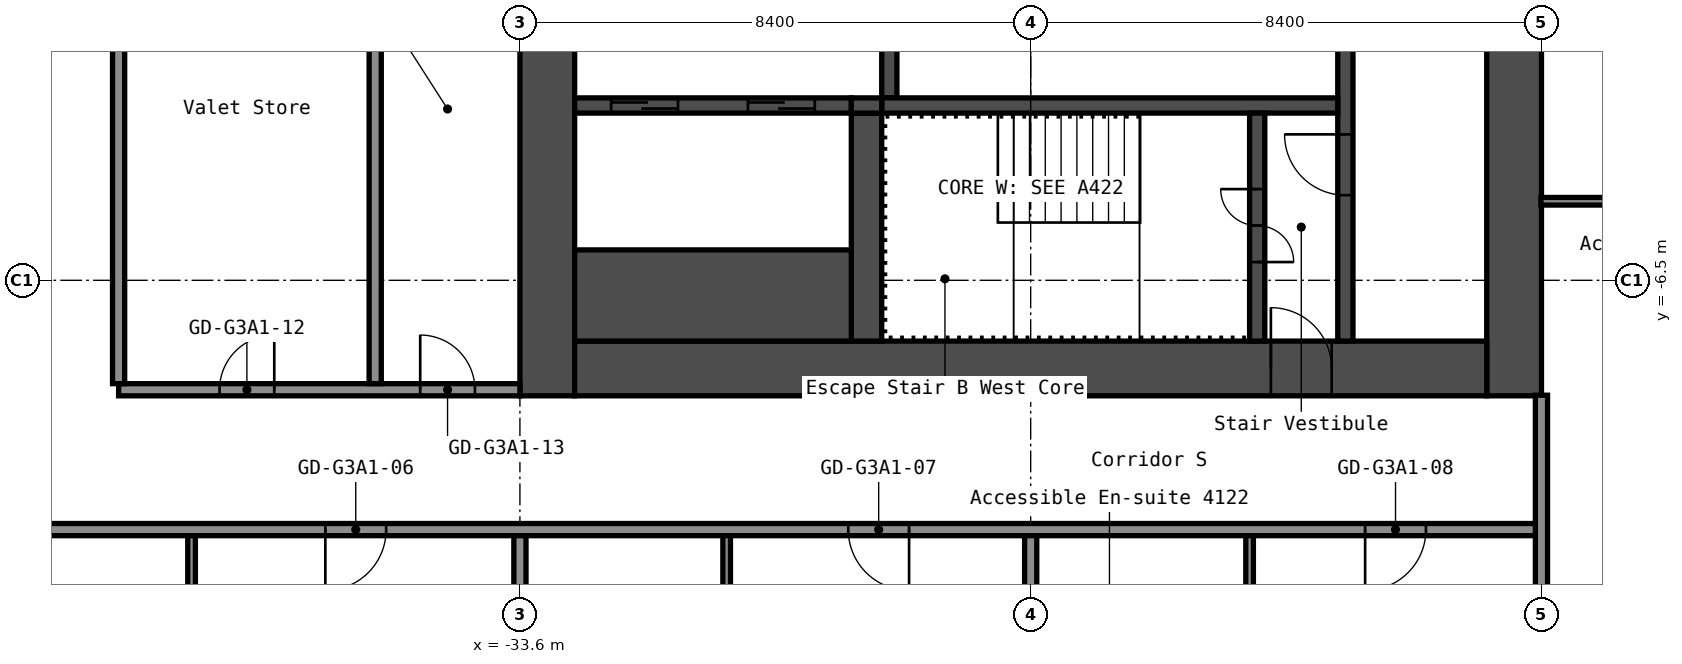
"""IFC4 building model, lengths in metres.
Left out: names, types, materials, properties, quantities, classifications, styles, units other than length and angle.
Written with IfcOpenShell. Run it as: python <this file> out.ifc"""

import sys

from ifc_helpers import new_model, si_unit, direction, frame, frame_2d, origin, place, context, subcontext, project, spatial, rectangle, extrude, element, fill, save


model = new_model("IFC4")
c1 = context("Model", 3, precision=1e-05, world=origin(), true_north=direction((0.0, 1.0)))
c2 = subcontext(c1, "Body", "Model", "MODEL_VIEW")
j1 = project(units=[si_unit("LENGTHUNIT", "METRE"), si_unit("PLANEANGLEUNIT", "RADIAN")], contexts=[c1])
p1 = place(None, origin())
s1 = spatial("IfcSite", under=j1, at=p1, CompositionType="ELEMENT")
p2 = place(p1, origin())
s2 = spatial("IfcBuilding", under=s1, at=p2, CompositionType="ELEMENT")
p3 = place(p2, frame((0.0, 0.0, 147.0)))
s3 = spatial("IfcBuildingStorey", under=s2, at=p3, CompositionType="ELEMENT", Elevation=147.0)
p4 = place(p3, frame((-17.25, -8.4, 0.0), z_axis=(0.0, 0.0, 1.0), x_axis=(0.0, 1.0, 0.0)))
e1 = element("IfcWall", 1, at=p4, inside=s3, PredefinedType="SHEAR", context=c2, shape_type="SweptSolid", body=[
    extrude(rectangle(XDim=16.8, YDim=0.9, at=frame_2d((8.4, 0.0))), origin(), (0.0, 0.0, 1.0), 2.75),
])
p5 = place(p4, frame((7.1, 0.0, 0.0)))
e2 = element("IfcOpeningElement", 2, at=p5, cuts=e1, PredefinedType="OPENING", context=c2, shape_type="SweptSolid", body=[
    extrude(rectangle(XDim=1.6, YDim=2.1, at=frame_2d((0.8, 1.05))), frame((0.0, 0.46, 0.0), z_axis=(0.0, -1.0, 0.0), x_axis=(1.0, 0.0, 0.0)), (0.0, 0.0, 1.0), 0.92),
])
p6 = place(p3, frame((-33.15, -8.4, 0.0), z_axis=(0.0, 0.0, 1.0), x_axis=(0.0, 1.0, 0.0)))
e3 = element("IfcWall", 3, at=p6, inside=s3, PredefinedType="SHEAR", context=c2, shape_type="SweptSolid", body=[
    extrude(rectangle(XDim=16.8, YDim=0.9, at=frame_2d((8.4, 0.0))), origin(), (0.0, 0.0, 1.0), 2.75),
])
p7 = place(p3, frame((-32.7, -7.95, 0.0), z_axis=(0.0, 0.0, 1.0), x_axis=(1.0, 0.0, 0.0)))
e4 = element("IfcWall", 4, at=p7, inside=s3, PredefinedType="SHEAR", context=c2, shape_type="SweptSolid", body=[
    extrude(rectangle(XDim=15.0, YDim=0.9, at=frame_2d((7.5, 0.0))), origin(), (0.0, 0.0, 1.0), 2.75),
])
p8 = place(p7, frame((11.45, 0.0, 0.0)))
e5 = element("IfcOpeningElement", 5, at=p8, cuts=e4, PredefinedType="OPENING", context=c2, shape_type="SweptSolid", body=[
    extrude(rectangle(XDim=1.0, YDim=2.1, at=frame_2d((0.5, 1.05))), frame((0.0, 0.46, 0.0), z_axis=(0.0, -1.0, 0.0), x_axis=(1.0, 0.0, 0.0)), (0.0, 0.0, 1.0), 0.92),
])
p9 = place(p3, frame((-20.025, -7.5, 0.0), z_axis=(0.0, 0.0, 1.0), x_axis=(0.0, 1.0, 0.0)))
e6 = element("IfcWall", 6, at=p9, inside=s3, PredefinedType="SHEAR", context=c2, shape_type="SweptSolid", body=[
    extrude(rectangle(XDim=6.3, YDim=0.25, at=frame_2d((3.15, 0.0))), origin(), (0.0, 0.0, 1.0), 2.75),
])
p10 = place(p9, frame((2.4, 0.0, 0.0)))
e7 = element("IfcOpeningElement", 7, at=p10, cuts=e6, PredefinedType="OPENING", context=c2, shape_type="SweptSolid", body=[
    extrude(rectangle(XDim=1.0, YDim=2.1, at=frame_2d((0.5, 1.05))), frame((0.0, 0.135, 0.0), z_axis=(0.0, -1.0, 0.0), x_axis=(1.0, 0.0, 0.0)), (0.0, 0.0, 1.0), 0.27),
])
p11 = place(p3, frame((-27.525, -3.5, 0.0), z_axis=(0.0, 0.0, 1.0), x_axis=(0.0, 1.0, 0.0)))
e8 = element("IfcWall", 8, at=p11, inside=s3, PredefinedType="SHEAR", context=c2, shape_type="SweptSolid", body=[
    extrude(rectangle(XDim=2.05, YDim=0.25, at=frame_2d((1.025, 0.0))), origin(), (0.0, 0.0, 1.0), 2.75),
])
p12 = place(p3, frame((-27.65, -3.625, 0.0), z_axis=(0.0, 0.0, 1.0), x_axis=(1.0, 0.0, 0.0)))
e9 = element("IfcWall", 9, at=p12, inside=s3, PredefinedType="SHEAR", context=c2, shape_type="SweptSolid", body=[
    extrude(rectangle(XDim=7.5, YDim=0.25, at=frame_2d((3.75, 0.0))), origin(), (0.0, 0.0, 1.0), 2.75),
])
p13 = place(p3, frame((-21.475, -7.5, 0.0), z_axis=(0.0, 0.0, 1.0), x_axis=(0.0, 1.0, 0.0)))
e10 = element("IfcWall", 10, at=p13, inside=s3, PredefinedType="SHEAR", context=c2, shape_type="SweptSolid", body=[
    extrude(rectangle(XDim=3.75, YDim=0.25, at=frame_2d((1.875, 0.0))), origin(), (0.0, 0.0, 1.0), 2.75),
])
p14 = place(p13, frame((1.3, 0.0, 0.0)))
e11 = element("IfcOpeningElement", 11, at=p14, cuts=e10, PredefinedType="OPENING", context=c2, shape_type="SweptSolid", body=[
    extrude(rectangle(XDim=1.2, YDim=2.1, at=frame_2d((0.6, 1.05))), frame((0.0, 0.135, 0.0), z_axis=(0.0, -1.0, 0.0), x_axis=(1.0, 0.0, 0.0)), (0.0, 0.0, 1.0), 0.27),
])
p15 = place(p3, frame((-27.9, -7.5, 0.0), z_axis=(0.0, 0.0, 1.0), x_axis=(0.0, 1.0, 0.0)))
e12 = element("IfcWall", 12, at=p15, inside=s3, PredefinedType="SHEAR", context=c2, shape_type="SweptSolid", body=[
    extrude(rectangle(XDim=3.75, YDim=0.5, at=frame_2d((1.875, 0.0))), origin(), (0.0, 0.0, 1.0), 2.75),
])
p16 = place(p3, frame((-32.7, -3.625, 0.0), z_axis=(0.0, 0.0, 1.0), x_axis=(1.0, 0.0, 0.0)))
e13 = element("IfcWall", 13, at=p16, inside=s3, PredefinedType="SHEAR", context=c2, shape_type="SweptSolid", body=[
    extrude(rectangle(XDim=4.55, YDim=0.25, at=frame_2d((2.275, 0.0))), origin(), (0.0, 0.0, 1.0), 2.75),
])
p17 = place(p16, frame((2.85, 0.0, 0.0)))
e14 = element("IfcOpeningElement", 14, at=p17, cuts=e13, PredefinedType="OPENING", context=c2, shape_type="SweptSolid", body=[
    extrude(rectangle(XDim=1.1, YDim=2.1, at=frame_2d((0.55, 1.05))), frame((0.0, 0.135, 0.0), z_axis=(0.0, -1.0, 0.0), x_axis=(1.0, 0.0, 0.0)), (0.0, 0.0, 1.0), 0.27),
])
p18 = place(p16, frame((0.6, 0.0, 0.0)))
e15 = element("IfcOpeningElement", 15, at=p18, cuts=e13, PredefinedType="OPENING", context=c2, shape_type="SweptSolid", body=[
    extrude(rectangle(XDim=1.1, YDim=2.1, at=frame_2d((0.55, 1.05))), frame((0.0, 0.135, 0.0), z_axis=(0.0, -1.0, 0.0), x_axis=(1.0, 0.0, 0.0)), (0.0, 0.0, 1.0), 0.27),
])
p19 = place(p3, frame((-32.7, -6.75, 0.0), z_axis=(0.0, 0.0, 1.0), x_axis=(1.0, 0.0, 0.0)))
e16 = element("IfcWall", 16, at=p19, inside=s3, PredefinedType="SHEAR", context=c2, shape_type="SweptSolid", body=[
    extrude(rectangle(XDim=4.55, YDim=1.5, at=frame_2d((2.275, 0.0))), origin(), (0.0, 0.0, 1.0), 2.75),
])
p20 = place(p3, frame((-28.15, -3.625, 0.0), z_axis=(0.0, 0.0, 1.0), x_axis=(1.0, 0.0, 0.0)))
e17 = element("IfcWall", 17, at=p20, inside=s3, PredefinedType="SHEAR", context=c2, shape_type="SweptSolid", body=[
    extrude(rectangle(XDim=0.5, YDim=0.25, at=frame_2d((0.25, 0.0))), origin(), (0.0, 0.0, 1.0), 2.75),
])
p21 = place(p3, frame((-42.7, -10.6, 0.0), z_axis=(0.0, 0.0, 1.0), x_axis=(1.0, 0.0, 0.0)))
e18 = element("IfcWall", 18, at=p21, inside=s3, PredefinedType="PARTITIONING", context=c2, shape_type="SweptSolid", body=[
    extrude(rectangle(XDim=25.9, YDim=0.2, at=frame_2d((12.95, 0.0))), origin(), (0.0, 0.0, 1.0), 2.75),
])
p22 = place(p21, frame((5.9, 0.0, 0.0)))
e19 = element("IfcOpeningElement", 19, at=p22, cuts=e18, PredefinedType="OPENING", context=c2, shape_type="SweptSolid", body=[
    extrude(rectangle(XDim=1.0, YDim=2.1, at=frame_2d((0.5, 1.05))), frame((0.0, 0.11, 0.0), z_axis=(0.0, -1.0, 0.0), x_axis=(1.0, 0.0, 0.0)), (0.0, 0.0, 1.0), 0.22),
])
p23 = place(p21, frame((14.5, 0.0, 0.0)))
e20 = element("IfcOpeningElement", 20, at=p23, cuts=e18, PredefinedType="OPENING", context=c2, shape_type="SweptSolid", body=[
    extrude(rectangle(XDim=1.0, YDim=2.1, at=frame_2d((0.5, 1.05))), frame((0.0, 0.11, 0.0), z_axis=(0.0, -1.0, 0.0), x_axis=(1.0, 0.0, 0.0)), (0.0, 0.0, 1.0), 0.22),
])
p24 = place(p21, frame((23.0, 0.0, 0.0)))
e21 = element("IfcOpeningElement", 21, at=p24, cuts=e18, PredefinedType="OPENING", context=c2, shape_type="SweptSolid", body=[
    extrude(rectangle(XDim=1.0, YDim=2.1, at=frame_2d((0.5, 1.05))), frame((0.0, 0.11, 0.0), z_axis=(0.0, -1.0, 0.0), x_axis=(1.0, 0.0, 0.0)), (0.0, 0.0, 1.0), 0.22),
])
p25 = place(p3, frame((-40.2, -8.3, 0.0), z_axis=(0.0, 0.0, 1.0), x_axis=(1.0, 0.0, 0.0)))
e22 = element("IfcWall", 22, at=p25, inside=s3, PredefinedType="PARTITIONING", context=c2, shape_type="SweptSolid", body=[
    extrude(rectangle(XDim=6.6, YDim=0.2, at=frame_2d((3.3, 0.0))), origin(), (0.0, 0.0, 1.0), 2.75),
])
p26 = place(p25, frame((1.66, 0.0, 0.0)))
e23 = element("IfcOpeningElement", 23, at=p26, cuts=e22, PredefinedType="OPENING", context=c2, shape_type="SweptSolid", body=[
    extrude(rectangle(XDim=0.9, YDim=2.1, at=frame_2d((0.45, 1.05))), frame((0.0, 0.11, 0.0), z_axis=(0.0, -1.0, 0.0), x_axis=(1.0, 0.0, 0.0)), (0.0, 0.0, 1.0), 0.22),
])
p27 = place(p25, frame((4.96, 0.0, 0.0)))
e24 = element("IfcOpeningElement", 24, at=p27, cuts=e22, PredefinedType="OPENING", context=c2, shape_type="SweptSolid", body=[
    extrude(rectangle(XDim=0.9, YDim=2.1, at=frame_2d((0.45, 1.05))), frame((0.0, 0.11, 0.0), z_axis=(0.0, -1.0, 0.0), x_axis=(1.0, 0.0, 0.0)), (0.0, 0.0, 1.0), 0.22),
])
p28 = place(p3, frame((-16.81, -5.2, 0.0), z_axis=(0.0, 0.0, 1.0), x_axis=(1.0, 0.0, 0.0)))
e25 = element("IfcWall", 25, at=p28, inside=s3, PredefinedType="PARTITIONING", context=c2, shape_type="SweptSolid", body=[
    extrude(rectangle(XDim=3.548, YDim=0.125, at=frame_2d((1.774, 0.0))), origin(), (0.0, 0.0, 1.0), 2.75),
])
p29 = place(p3, frame((-40.2, -8.2, 0.0), z_axis=(0.0, 0.0, 1.0), x_axis=(0.0, 1.0, 0.0)))
e26 = element("IfcWall", 26, at=p29, inside=s3, PredefinedType="PARTITIONING", context=c2, shape_type="SweptSolid", body=[
    extrude(rectangle(XDim=16.4, YDim=0.2, at=frame_2d((8.2, 0.0))), origin(), (0.0, 0.0, 1.0), 2.75),
])
p30 = place(p3, frame((-39.0, -14.0, 0.0), z_axis=(0.0, 0.0, 1.0), x_axis=(0.0, 1.0, 0.0)))
e27 = element("IfcWall", 27, at=p30, inside=s3, PredefinedType="PARTITIONING", context=c2, shape_type="SweptSolid", body=[
    extrude(rectangle(XDim=3.3, YDim=0.125, at=frame_2d((1.65, 0.0))), origin(), (0.0, 0.0, 1.0), 2.75),
])
p31 = place(p3, frame((-35.98, -8.2, 0.0), z_axis=(0.0, 0.0, 1.0), x_axis=(0.0, 1.0, 0.0)))
e28 = element("IfcWall", 28, at=p31, inside=s3, PredefinedType="PARTITIONING", context=c2, shape_type="SweptSolid", body=[
    extrude(rectangle(XDim=8.2, YDim=0.2, at=frame_2d((4.1, 0.0))), origin(), (0.0, 0.0, 1.0), 2.75),
])
p32 = place(p3, frame((-33.6, -19.3, 0.0), z_axis=(0.0, 0.0, 1.0), x_axis=(0.0, 1.0, 0.0)))
e29 = element("IfcWall", 29, at=p32, inside=s3, PredefinedType="PARTITIONING", context=c2, shape_type="SweptSolid", body=[
    extrude(rectangle(XDim=8.6, YDim=0.2, at=frame_2d((4.3, 0.0))), origin(), (0.0, 0.0, 1.0), 2.75),
])
p33 = place(p3, frame((-30.2, -14.0, 0.0), z_axis=(0.0, 0.0, 1.0), x_axis=(0.0, 1.0, 0.0)))
e30 = element("IfcWall", 30, at=p33, inside=s3, PredefinedType="PARTITIONING", context=c2, shape_type="SweptSolid", body=[
    extrude(rectangle(XDim=3.3, YDim=0.125, at=frame_2d((1.65, 0.0))), origin(), (0.0, 0.0, 1.0), 2.75),
])
p34 = place(p3, frame((-25.2, -19.3, 0.0), z_axis=(0.0, 0.0, 1.0), x_axis=(0.0, 1.0, 0.0)))
e31 = element("IfcWall", 31, at=p34, inside=s3, PredefinedType="PARTITIONING", context=c2, shape_type="SweptSolid", body=[
    extrude(rectangle(XDim=8.6, YDim=0.2, at=frame_2d((4.3, 0.0))), origin(), (0.0, 0.0, 1.0), 2.75),
])
p35 = place(p3, frame((-21.6, -14.0, 0.0), z_axis=(0.0, 0.0, 1.0), x_axis=(0.0, 1.0, 0.0)))
e32 = element("IfcWall", 32, at=p35, inside=s3, PredefinedType="PARTITIONING", context=c2, shape_type="SweptSolid", body=[
    extrude(rectangle(XDim=3.3, YDim=0.125, at=frame_2d((1.65, 0.0))), origin(), (0.0, 0.0, 1.0), 2.75),
])
p36 = place(p35, frame((1.2, 0.0, 0.0)))
e33 = element("IfcOpeningElement", 33, at=p36, cuts=e32, PredefinedType="OPENING", context=c2, shape_type="SweptSolid", body=[
    extrude(rectangle(XDim=1.0, YDim=2.1, at=frame_2d((0.5, 1.05))), frame((0.0, 0.073, 0.0), z_axis=(0.0, -1.0, 0.0), x_axis=(1.0, 0.0, 0.0)), (0.0, 0.0, 1.0), 0.145),
])
p37 = place(p3, frame((-16.8, -19.3, 0.0), z_axis=(0.0, 0.0, 1.0), x_axis=(0.0, 1.0, 0.0)))
e34 = element("IfcWall", 34, at=p37, inside=s3, PredefinedType="PARTITIONING", context=c2, shape_type="SweptSolid", body=[
    extrude(rectangle(XDim=10.91, YDim=0.2, at=frame_2d((5.455, 0.0))), origin(), (0.0, 0.0, 1.0), 2.75),
])
p38 = place(p8, origin())
e35 = element("IfcDoor", 35, at=p38, inside=s3, OperationType="SINGLE_SWING_RIGHT", PredefinedType="DOOR", context=c2, shape_type="SweptSolid", body=[
    extrude(rectangle(XDim=1.0, YDim=2.1, at=frame_2d((0.5, 1.05))), frame((0.0, 0.025, 0.0), z_axis=(0.0, -1.0, 0.0), x_axis=(1.0, 0.0, 0.0)), (0.0, 0.0, 1.0), 0.05),
])
fill(e5, e35)
p39 = place(p14, origin())
e36 = element("IfcDoor", 36, at=p39, inside=s3, OperationType="DOUBLE_DOOR_SINGLE_SWING", PredefinedType="DOOR", context=c2, shape_type="SweptSolid", body=[
    extrude(rectangle(XDim=1.2, YDim=2.1, at=frame_2d((0.6, 1.05))), frame((0.0, 0.025, 0.0), z_axis=(0.0, -1.0, 0.0), x_axis=(1.0, 0.0, 0.0)), (0.0, 0.0, 1.0), 0.05),
])
fill(e11, e36)
p40 = place(p10, origin())
e37 = element("IfcDoor", 37, at=p40, inside=s3, OperationType="SINGLE_SWING_LEFT", PredefinedType="DOOR", context=c2, shape_type="SweptSolid", body=[
    extrude(rectangle(XDim=1.0, YDim=2.1, at=frame_2d((0.5, 1.05))), frame((0.0, 0.025, 0.0), z_axis=(0.0, -1.0, 0.0), x_axis=(1.0, 0.0, 0.0)), (0.0, 0.0, 1.0), 0.05),
])
fill(e7, e37)
p41 = place(p17, origin())
e38 = element("IfcDoor", 38, at=p41, inside=s3, OperationType="DOUBLE_DOOR_SLIDING", PredefinedType="DOOR", context=c2, shape_type="SweptSolid", body=[
    extrude(rectangle(XDim=1.1, YDim=2.1, at=frame_2d((0.55, 1.05))), frame((0.0, 0.025, 0.0), z_axis=(0.0, -1.0, 0.0), x_axis=(1.0, 0.0, 0.0)), (0.0, 0.0, 1.0), 0.05),
])
fill(e14, e38)
p42 = place(p18, origin())
e39 = element("IfcDoor", 39, at=p42, inside=s3, OperationType="DOUBLE_DOOR_SLIDING", PredefinedType="DOOR", context=c2, shape_type="SweptSolid", body=[
    extrude(rectangle(XDim=1.1, YDim=2.1, at=frame_2d((0.55, 1.05))), frame((0.0, 0.025, 0.0), z_axis=(0.0, -1.0, 0.0), x_axis=(1.0, 0.0, 0.0)), (0.0, 0.0, 1.0), 0.05),
])
fill(e15, e39)
p43 = place(p22, origin())
e40 = element("IfcDoor", 40, at=p43, inside=s3, OperationType="SINGLE_SWING_LEFT", PredefinedType="DOOR", context=c2, shape_type="SweptSolid", body=[
    extrude(rectangle(XDim=1.0, YDim=2.1, at=frame_2d((0.5, 1.05))), frame((0.0, 0.025, 0.0), z_axis=(0.0, -1.0, 0.0), x_axis=(1.0, 0.0, 0.0)), (0.0, 0.0, 1.0), 0.05),
])
fill(e19, e40)
p44 = place(p23, origin())
e41 = element("IfcDoor", 41, at=p44, inside=s3, OperationType="SINGLE_SWING_RIGHT", PredefinedType="DOOR", context=c2, shape_type="SweptSolid", body=[
    extrude(rectangle(XDim=1.0, YDim=2.1, at=frame_2d((0.5, 1.05))), frame((0.0, 0.025, 0.0), z_axis=(0.0, -1.0, 0.0), x_axis=(1.0, 0.0, 0.0)), (0.0, 0.0, 1.0), 0.05),
])
fill(e20, e41)
p45 = place(p24, origin())
e42 = element("IfcDoor", 42, at=p45, inside=s3, OperationType="SINGLE_SWING_LEFT", PredefinedType="DOOR", context=c2, shape_type="SweptSolid", body=[
    extrude(rectangle(XDim=1.0, YDim=2.1, at=frame_2d((0.5, 1.05))), frame((0.0, 0.025, 0.0), z_axis=(0.0, -1.0, 0.0), x_axis=(1.0, 0.0, 0.0)), (0.0, 0.0, 1.0), 0.05),
])
fill(e21, e42)
p46 = place(p26, origin())
e43 = element("IfcDoor", 43, at=p46, inside=s3, OperationType="SINGLE_SWING_LEFT", PredefinedType="DOOR", context=c2, shape_type="SweptSolid", body=[
    extrude(rectangle(XDim=0.9, YDim=2.1, at=frame_2d((0.45, 1.05))), frame((0.0, 0.025, 0.0), z_axis=(0.0, -1.0, 0.0), x_axis=(1.0, 0.0, 0.0)), (0.0, 0.0, 1.0), 0.05),
])
fill(e23, e43)
p47 = place(p27, origin())
e44 = element("IfcDoor", 44, at=p47, inside=s3, OperationType="SINGLE_SWING_RIGHT", PredefinedType="DOOR", context=c2, shape_type="SweptSolid", body=[
    extrude(rectangle(XDim=0.9, YDim=2.1, at=frame_2d((0.45, 1.05))), frame((0.0, 0.025, 0.0), z_axis=(0.0, -1.0, 0.0), x_axis=(1.0, 0.0, 0.0)), (0.0, 0.0, 1.0), 0.05),
])
fill(e24, e44)
save(model, sys.argv[1])
